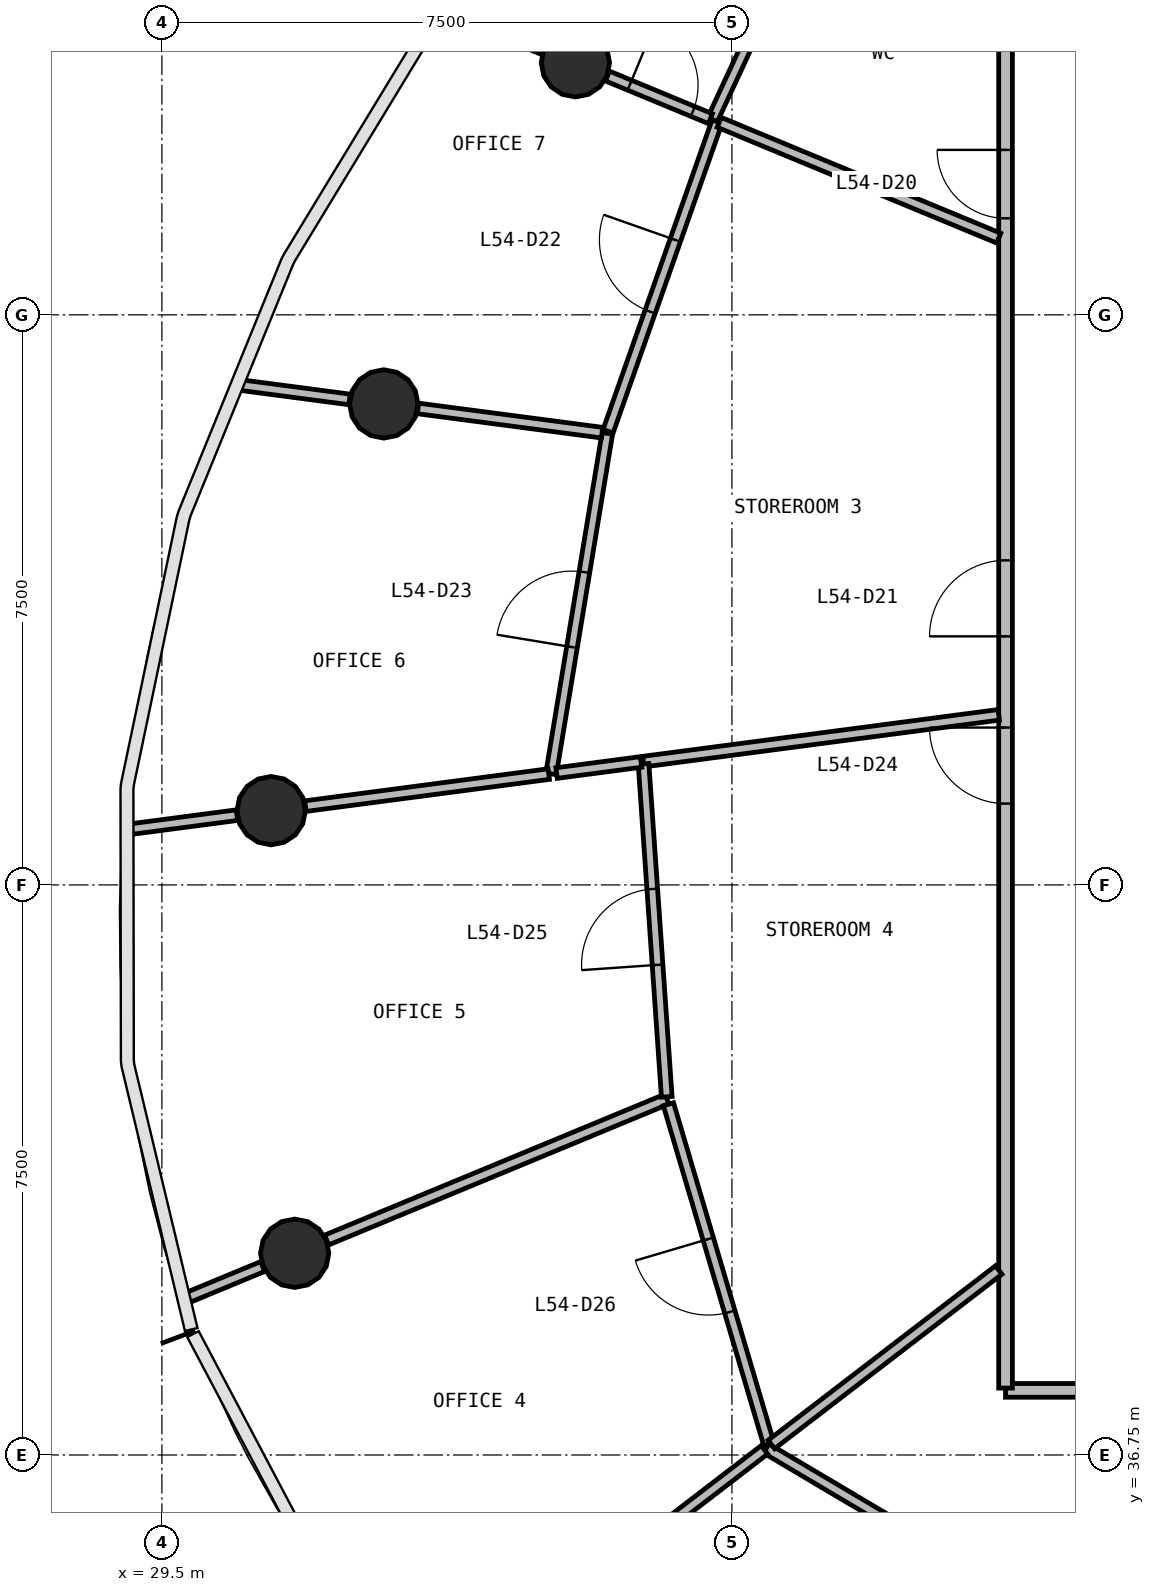
"""IFC4 building model, lengths in metres.
Left out: names, types, materials, properties, quantities, classifications, styles, units other than length and angle.
Written with IfcOpenShell. Run it as: python <this file> out.ifc"""

import sys

from ifc_helpers import new_model, si_unit, direction, frame, frame_2d, origin, origin_2d, place, context, subcontext, project, spatial, rectangle, circle, extrude, source, transform, mapped, element, fill, save


model = new_model("IFC4")
c1 = context("Model", 3, precision=1e-05, world=origin(), true_north=direction((0.0, 1.0)))
c2 = subcontext(c1, "Body", "Model", "MODEL_VIEW")
j1 = project(units=[si_unit("LENGTHUNIT", "METRE"), si_unit("PLANEANGLEUNIT", "RADIAN")], contexts=[c1])
p1 = place(None, origin())
s1 = spatial("IfcSite", under=j1, at=p1, CompositionType="ELEMENT")
p2 = place(p1, origin())
s2 = spatial("IfcBuilding", under=s1, at=p2, CompositionType="ELEMENT")
p3 = place(p2, frame((0.0, 0.0, 222.8)))
s3 = spatial("IfcBuildingStorey", under=s2, at=p3, CompositionType="ELEMENT", Elevation=222.8)
m1 = source(origin(), c2, "Body", "SweptSolid", [
    extrude(circle(Radius=0.45, at=origin_2d()), origin(), (0.0, 0.0, 1.0), 3.9),
])
for number, where, z_axis, x_axis in (
    (1, (34.941, 55.066, 0.0), (0.0, 0.0, 1.0), (1.0, 0.0, 0.0)),
    (2, (32.419, 50.578, 0.0), (0.0, 0.0, 1.0), (1.0, 0.0, 0.0)),
    (3, (30.938, 45.227, 0.0), (0.0, 0.0, 1.0), (1.0, 0.0, 0.0)),
    (4, (31.247, 39.404, 0.0), (0.0, 0.0, 1.0), (1.0, 0.0, 0.0)),
):
    element("IfcColumn", number, at=place(p3, frame(where, z_axis=z_axis, x_axis=x_axis)), inside=s3, PredefinedType="COLUMN", context=c2, shape_type="MappedRepresentation", body=[
        mapped(m1, transform((0.0, 0.0, 0.0), scale=1.0)),
    ])
p4 = place(p3, frame((63.4, 37.6, 0.0), z_axis=(0.0, 0.0, 1.0), x_axis=(-1.0, 0.0, 0.0)))
e5 = element("IfcWall", 5, at=p4, inside=s3, PredefinedType="PARTITIONING", context=c2, shape_type="SweptSolid", body=[
    extrude(rectangle(XDim=22.8, YDim=0.18, at=frame_2d((11.4, 0.0))), origin(), (0.0, 0.0, 1.0), 2.88),
])
p5 = place(p4, frame((12.95, 0.0, 0.0)))
e6 = element("IfcOpeningElement", 6, at=p5, cuts=e5, PredefinedType="OPENING", context=c2, shape_type="SweptSolid", body=[
    extrude(rectangle(XDim=1.0, YDim=2.1, at=frame_2d((0.5, 1.05))), frame((0.0, 0.1, 0.0), z_axis=(0.0, -1.0, 0.0), x_axis=(1.0, 0.0, 0.0)), (0.0, 0.0, 1.0), 0.2),
])
p6 = place(p4, frame((10.95, 0.0, 0.0)))
e7 = element("IfcOpeningElement", 7, at=p6, cuts=e5, PredefinedType="OPENING", context=c2, shape_type="SweptSolid", body=[
    extrude(rectangle(XDim=1.0, YDim=2.1, at=frame_2d((0.5, 1.05))), frame((0.0, 0.1, 0.0), z_axis=(0.0, -1.0, 0.0), x_axis=(1.0, 0.0, 0.0)), (0.0, 0.0, 1.0), 0.2),
])
p7 = place(p3, frame((40.6, 37.63, 0.0), z_axis=(0.0, 0.0, 1.0), x_axis=(0.0, 1.0, 0.0)))
e8 = element("IfcWall", 8, at=p7, inside=s3, PredefinedType="PARTITIONING", context=c2, shape_type="SweptSolid", body=[
    extrude(rectangle(XDim=20.74, YDim=0.18, at=frame_2d((10.37, 0.0))), origin(), (0.0, 0.0, 1.0), 2.88),
])
p8 = place(p7, frame((15.39, 0.0, 0.0)))
e9 = element("IfcOpeningElement", 9, at=p8, cuts=e8, PredefinedType="OPENING", context=c2, shape_type="SweptSolid", body=[
    extrude(rectangle(XDim=0.9, YDim=2.1, at=frame_2d((0.45, 1.05))), frame((0.0, 0.1, 0.0), z_axis=(0.0, -1.0, 0.0), x_axis=(1.0, 0.0, 0.0)), (0.0, 0.0, 1.0), 0.2),
])
p9 = place(p7, frame((9.89, 0.0, 0.0)))
e10 = element("IfcOpeningElement", 10, at=p9, cuts=e8, PredefinedType="OPENING", context=c2, shape_type="SweptSolid", body=[
    extrude(rectangle(XDim=1.0, YDim=2.1, at=frame_2d((0.5, 1.05))), frame((0.0, 0.1, 0.0), z_axis=(0.0, -1.0, 0.0), x_axis=(1.0, 0.0, 0.0)), (0.0, 0.0, 1.0), 0.2),
])
p10 = place(p7, frame((7.69, 0.0, 0.0)))
e11 = element("IfcOpeningElement", 11, at=p10, cuts=e8, PredefinedType="OPENING", context=c2, shape_type="SweptSolid", body=[
    extrude(rectangle(XDim=1.0, YDim=2.1, at=frame_2d((0.5, 1.05))), frame((0.0, 0.1, 0.0), z_axis=(0.0, -1.0, 0.0), x_axis=(1.0, 0.0, 0.0)), (0.0, 0.0, 1.0), 0.2),
])
p11 = place(p3, frame((36.145, 41.433, 0.0), z_axis=(0.0, 0.0, 1.0), x_axis=(-0.92386639671, -0.382715143454, 0.0)))
e12 = element("IfcWall", 12, at=p11, inside=s3, PredefinedType="PARTITIONING", context=c2, shape_type="SweptSolid", body=[
    extrude(rectangle(XDim=4.846, YDim=0.14, at=frame_2d((2.423, 0.0))), origin(), (0.0, 0.0, 1.0), 2.88),
])
p12 = place(p3, frame((40.51, 46.487, 0.0), z_axis=(0.0, 0.0, 1.0), x_axis=(-0.99144583503, -0.13051879635, 0.0)))
e13 = element("IfcWall", 13, at=p12, inside=s3, PredefinedType="PARTITIONING", context=c2, shape_type="SweptSolid", body=[
    extrude(rectangle(XDim=4.716, YDim=0.14, at=frame_2d((2.358, 0.0))), origin(), (0.0, 0.0, 1.0), 2.88),
])
p13 = place(p3, frame((41.563, 34.399, 0.0), z_axis=(0.0, 0.0, 1.0), x_axis=(-0.860189471965, 0.509974580072, 0.0)))
e14 = element("IfcWall", 14, at=p13, inside=s3, PredefinedType="PARTITIONING", context=c2, shape_type="SweptSolid", body=[
    extrude(rectangle(XDim=4.78, YDim=0.14, at=frame_2d((2.39, 0.0))), origin(), (0.0, 0.0, 1.0), 2.88),
])
p14 = place(p13, frame((1.93, 0.0, 0.0)))
e15 = element("IfcOpeningElement", 15, at=p14, cuts=e14, PredefinedType="OPENING", context=c2, shape_type="SweptSolid", body=[
    extrude(rectangle(XDim=1.0, YDim=2.1, at=frame_2d((0.5, 1.05))), frame((0.0, 0.08, 0.0), z_axis=(0.0, -1.0, 0.0), x_axis=(1.0, 0.0, 0.0)), (0.0, 0.0, 1.0), 0.16),
])
p15 = place(p3, frame((37.486, 36.895, 0.0), z_axis=(0.0, 0.0, 1.0), x_axis=(-0.283453427103, 0.958986003372, 0.0)))
e16 = element("IfcWall", 16, at=p15, inside=s3, PredefinedType="PARTITIONING", context=c2, shape_type="SweptSolid", body=[
    extrude(rectangle(XDim=4.661, YDim=0.14, at=frame_2d((2.331, 0.0))), origin(), (0.0, 0.0, 1.0), 2.88),
])
p16 = place(p15, frame((1.812, 0.0, 0.0)))
e17 = element("IfcOpeningElement", 17, at=p16, cuts=e16, PredefinedType="OPENING", context=c2, shape_type="SweptSolid", body=[
    extrude(rectangle(XDim=1.0, YDim=2.1, at=frame_2d((0.5, 1.05))), frame((0.0, 0.08, 0.0), z_axis=(0.0, -1.0, 0.0), x_axis=(1.0, 0.0, 0.0)), (0.0, 0.0, 1.0), 0.16),
])
p17 = place(p3, frame((34.62, 45.712, 0.0), z_axis=(0.0, 0.0, 1.0), x_axis=(0.163116833083, 0.986606759943, 0.0)))
e18 = element("IfcWall", 18, at=p17, inside=s3, PredefinedType="PARTITIONING", context=c2, shape_type="SweptSolid", body=[
    extrude(rectangle(XDim=4.54, YDim=0.14, at=frame_2d((2.27, 0.0))), origin(), (0.0, 0.0, 1.0), 2.88),
])
p18 = place(p17, frame((1.689, 0.0, 0.0)))
e19 = element("IfcOpeningElement", 19, at=p18, cuts=e18, PredefinedType="OPENING", context=c2, shape_type="SweptSolid", body=[
    extrude(rectangle(XDim=1.0, YDim=2.1, at=frame_2d((0.5, 1.05))), frame((0.0, 0.08, 0.0), z_axis=(0.0, -1.0, 0.0), x_axis=(1.0, 0.0, 0.0)), (0.0, 0.0, 1.0), 0.16),
])
p19 = place(p3, frame((36.143, 41.462, 0.0), z_axis=(0.0, 0.0, 1.0), x_axis=(-0.069626577794, 0.997573124971, 0.0)))
e20 = element("IfcWall", 20, at=p19, inside=s3, PredefinedType="PARTITIONING", context=c2, shape_type="SweptSolid", body=[
    extrude(rectangle(XDim=4.39, YDim=0.14, at=frame_2d((2.195, 0.0))), origin(), (0.0, 0.0, 1.0), 2.88),
])
p20 = place(p19, frame((1.74, 0.0, 0.0)))
e21 = element("IfcOpeningElement", 21, at=p20, cuts=e20, PredefinedType="OPENING", context=c2, shape_type="SweptSolid", body=[
    extrude(rectangle(XDim=1.0, YDim=2.1, at=frame_2d((0.5, 1.05))), frame((0.0, 0.08, 0.0), z_axis=(0.0, -1.0, 0.0), x_axis=(1.0, 0.0, 0.0)), (0.0, 0.0, 1.0), 0.16),
])
p21 = place(p3, frame((38.576, 58.264, 0.0), z_axis=(0.0, 0.0, 1.0), x_axis=(-0.421068424285, -0.907028876095, 0.0)))
e22 = element("IfcWall", 22, at=p21, inside=s3, PredefinedType="PARTITIONING", context=c2, shape_type="SweptSolid", body=[
    extrude(rectangle(XDim=4.349, YDim=0.14, at=frame_2d((2.175, 0.0))), origin(), (0.0, 0.0, 1.0), 2.88),
])
p22 = place(p3, frame((35.371, 50.219, 0.0), z_axis=(0.0, 0.0, 1.0), x_axis=(0.331994733927, 0.943281239421, 0.0)))
e23 = element("IfcWall", 23, at=p22, inside=s3, PredefinedType="PARTITIONING", context=c2, shape_type="SweptSolid", body=[
    extrude(rectangle(XDim=4.317, YDim=0.14, at=frame_2d((2.159, 0.0))), origin(), (0.0, 0.0, 1.0), 2.88),
])
p23 = place(p22, frame((1.667, 0.0, 0.0)))
e24 = element("IfcOpeningElement", 24, at=p23, cuts=e23, PredefinedType="OPENING", context=c2, shape_type="SweptSolid", body=[
    extrude(rectangle(XDim=1.0, YDim=2.1, at=frame_2d((0.5, 1.05))), frame((0.0, 0.08, 0.0), z_axis=(0.0, -1.0, 0.0), x_axis=(1.0, 0.0, 0.0)), (0.0, 0.0, 1.0), 0.16),
])
p24 = place(p3, frame((40.51, 52.759, 0.0), z_axis=(0.0, 0.0, 1.0), x_axis=(-0.923877031545, 0.382689470177, 0.0)))
e25 = element("IfcWall", 25, at=p24, inside=s3, PredefinedType="PARTITIONING", context=c2, shape_type="SweptSolid", body=[
    extrude(rectangle(XDim=3.98, YDim=0.14, at=frame_2d((1.99, 0.0))), origin(), (0.0, 0.0, 1.0), 2.88),
])
p25 = place(p3, frame((40.51, 39.183, 0.0), z_axis=(0.0, 0.0, 1.0), x_axis=(-0.793338419563, -0.608780873587, 0.0)))
e26 = element("IfcWall", 26, at=p25, inside=s3, PredefinedType="PARTITIONING", context=c2, shape_type="SweptSolid", body=[
    extrude(rectangle(XDim=3.77, YDim=0.14, at=frame_2d((1.885, 0.0))), origin(), (0.0, 0.0, 1.0), 2.88),
])
p26 = place(p3, frame((37.427, 36.818, 0.0), z_axis=(0.0, 0.0, 1.0), x_axis=(-0.793348756972, -0.608767402061, 0.0)))
e27 = element("IfcWall", 27, at=p26, inside=s3, PredefinedType="PARTITIONING", context=c2, shape_type="SweptSolid", body=[
    extrude(rectangle(XDim=3.616, YDim=0.14, at=frame_2d((1.808, 0.0))), origin(), (0.0, 0.0, 1.0), 2.88),
])
p27 = place(p3, frame((34.59, 45.708, 0.0), z_axis=(0.0, 0.0, 1.0), x_axis=(-0.991442456357, -0.130544458839, 0.0)))
e28 = element("IfcWall", 28, at=p27, inside=s3, PredefinedType="PARTITIONING", context=c2, shape_type="SweptSolid", body=[
    extrude(rectangle(XDim=3.23, YDim=0.14, at=frame_2d((1.615, 0.0))), origin(), (0.0, 0.0, 1.0), 2.88),
])
p28 = place(p3, frame((35.291, 50.2, 0.0), z_axis=(0.0, 0.0, 1.0), x_axis=(-0.991443064915, 0.130539836957, 0.0)))
e29 = element("IfcWall", 29, at=p28, inside=s3, PredefinedType="PARTITIONING", context=c2, shape_type="SweptSolid", body=[
    extrude(rectangle(XDim=2.443, YDim=0.14, at=frame_2d((1.221, 0.0))), origin(), (0.0, 0.0, 1.0), 2.88),
])
p29 = place(p3, frame((35.361, 54.892, 0.0), z_axis=(0.0, 0.0, 1.0), x_axis=(0.923887056475, -0.382665267404, 0.0)))
e30 = element("IfcWall", 30, at=p29, inside=s3, PredefinedType="PARTITIONING", context=c2, shape_type="SweptSolid", body=[
    extrude(rectangle(XDim=1.467, YDim=0.14, at=frame_2d((0.734, 0.0))), origin(), (0.0, 0.0, 1.0), 2.88),
])
p30 = place(p29, frame((0.317, 0.0, 0.0)))
e31 = element("IfcOpeningElement", 31, at=p30, cuts=e30, PredefinedType="OPENING", context=c2, shape_type="SweptSolid", body=[
    extrude(rectangle(XDim=0.9, YDim=2.1, at=frame_2d((0.45, 1.05))), frame((0.0, 0.08, 0.0), z_axis=(0.0, -1.0, 0.0), x_axis=(1.0, 0.0, 0.0)), (0.0, 0.0, 1.0), 0.16),
])
p31 = place(p3, frame((31.969, 50.637, 0.0), z_axis=(0.0, 0.0, 1.0), x_axis=(-0.991438884998, 0.130571579275, 0.0)))
e32 = element("IfcWall", 32, at=p31, inside=s3, PredefinedType="PARTITIONING", context=c2, shape_type="SweptSolid", body=[
    extrude(rectangle(XDim=1.457, YDim=0.14, at=frame_2d((0.728, 0.0))), origin(), (0.0, 0.0, 1.0), 2.88),
])
p32 = place(p3, frame((30.487, 45.168, 0.0), z_axis=(0.0, 0.0, 1.0), x_axis=(-0.991443005709, -0.130540286617, 0.0)))
e33 = element("IfcWall", 33, at=p32, inside=s3, PredefinedType="PARTITIONING", context=c2, shape_type="SweptSolid", body=[
    extrude(rectangle(XDim=1.399, YDim=0.14, at=frame_2d((0.699, 0.0))), origin(), (0.0, 0.0, 1.0), 2.88),
])
p33 = place(p3, frame((34.52, 55.24, 0.0), z_axis=(0.0, 0.0, 1.0), x_axis=(-0.923901775897, 0.382629727666, 0.0)))
e34 = element("IfcWall", 34, at=p33, inside=s3, PredefinedType="PARTITIONING", context=c2, shape_type="SweptSolid", body=[
    extrude(rectangle(XDim=1.319, YDim=0.14, at=frame_2d((0.659, 0.0))), origin(), (0.0, 0.0, 1.0), 2.88),
])
p34 = place(p3, frame((35.805, 45.868, 0.0), z_axis=(0.0, 0.0, 1.0), x_axis=(-0.991439475548, -0.130567095112, 0.0)))
e35 = element("IfcWall", 35, at=p34, inside=s3, PredefinedType="PARTITIONING", context=c2, shape_type="SweptSolid", body=[
    extrude(rectangle(XDim=1.122, YDim=0.14, at=frame_2d((0.561, 0.0))), origin(), (0.0, 0.0, 1.0), 2.88),
])
p35 = place(p3, frame((30.826, 39.23, 0.0), z_axis=(0.0, 0.0, 1.0), x_axis=(-0.92384548676, -0.382765615741, 0.0)))
e36 = element("IfcWall", 36, at=p35, inside=s3, PredefinedType="PARTITIONING", context=c2, shape_type="SweptSolid", body=[
    extrude(rectangle(XDim=1.059, YDim=0.14, at=frame_2d((0.53, 0.0))), origin(), (0.0, 0.0, 1.0), 2.88),
])
m2 = source(origin(), c2, "Body", "SweptSolid", [
    extrude(rectangle(XDim=0.9, YDim=2.1, at=frame_2d((0.45, 1.05))), frame((0.0, 0.025, 0.0), z_axis=(0.0, -1.0, 0.0), x_axis=(1.0, 0.0, 0.0)), (0.0, 0.0, 1.0), 0.05),
])
p36 = place(p8, origin())
e37 = element("IfcDoor", 37, at=p36, inside=s3, OperationType="SINGLE_SWING_RIGHT", PredefinedType="DOOR", context=c2, shape_type="MappedRepresentation", body=[
    mapped(m2, transform((0.0, 0.0, 0.0), scale=1.0)),
])
fill(e9, e37)
m3 = source(origin(), c2, "Body", "SweptSolid", [
    extrude(rectangle(XDim=1.0, YDim=2.1, at=frame_2d((0.5, 1.05))), frame((0.0, 0.025, 0.0), z_axis=(0.0, -1.0, 0.0), x_axis=(1.0, 0.0, 0.0)), (0.0, 0.0, 1.0), 0.05),
])
p37 = place(p9, origin())
e38 = element("IfcDoor", 38, at=p37, inside=s3, OperationType="SINGLE_SWING_LEFT", PredefinedType="DOOR", context=c2, shape_type="MappedRepresentation", body=[
    mapped(m3, transform((0.0, 0.0, 0.0), scale=1.0)),
])
fill(e10, e38)
p38 = place(p23, origin())
e39 = element("IfcDoor", 39, at=p38, inside=s3, OperationType="SINGLE_SWING_RIGHT", PredefinedType="DOOR", context=c2, shape_type="MappedRepresentation", body=[
    mapped(m3, transform((0.0, 0.0, 0.0), scale=1.0)),
])
fill(e24, e39)
p39 = place(p18, origin())
e40 = element("IfcDoor", 40, at=p39, inside=s3, OperationType="SINGLE_SWING_LEFT", PredefinedType="DOOR", context=c2, shape_type="MappedRepresentation", body=[
    mapped(m3, transform((0.0, 0.0, 0.0), scale=1.0)),
])
fill(e19, e40)
p40 = place(p10, origin())
e41 = element("IfcDoor", 41, at=p40, inside=s3, OperationType="SINGLE_SWING_RIGHT", PredefinedType="DOOR", context=c2, shape_type="MappedRepresentation", body=[
    mapped(m3, transform((0.0, 0.0, 0.0), scale=1.0)),
])
fill(e11, e41)
p41 = place(p20, origin())
e42 = element("IfcDoor", 42, at=p41, inside=s3, OperationType="SINGLE_SWING_LEFT", PredefinedType="DOOR", context=c2, shape_type="MappedRepresentation", body=[
    mapped(m3, transform((0.0, 0.0, 0.0), scale=1.0)),
])
fill(e21, e42)
p42 = place(p16, origin())
e43 = element("IfcDoor", 43, at=p42, inside=s3, OperationType="SINGLE_SWING_RIGHT", PredefinedType="DOOR", context=c2, shape_type="MappedRepresentation", body=[
    mapped(m3, transform((0.0, 0.0, 0.0), scale=1.0)),
])
fill(e17, e43)
m4 = source(origin(), c2, "Body", "SweptSolid", [
    extrude(rectangle(XDim=0.9, YDim=2.1, at=frame_2d((0.45, 1.05))), frame((0.0, 0.025, 0.0), z_axis=(0.0, -1.0, 0.0), x_axis=(1.0, 0.0, 0.0)), (0.0, 0.0, 1.0), 0.05),
])
p43 = place(p30, origin())
e44 = element("IfcDoor", 44, at=p43, inside=s3, OperationType="SINGLE_SWING_LEFT", PredefinedType="DOOR", context=c2, shape_type="MappedRepresentation", body=[
    mapped(m4, transform((0.0, 0.0, 0.0), scale=1.0)),
])
fill(e31, e44)
save(model, sys.argv[1])
